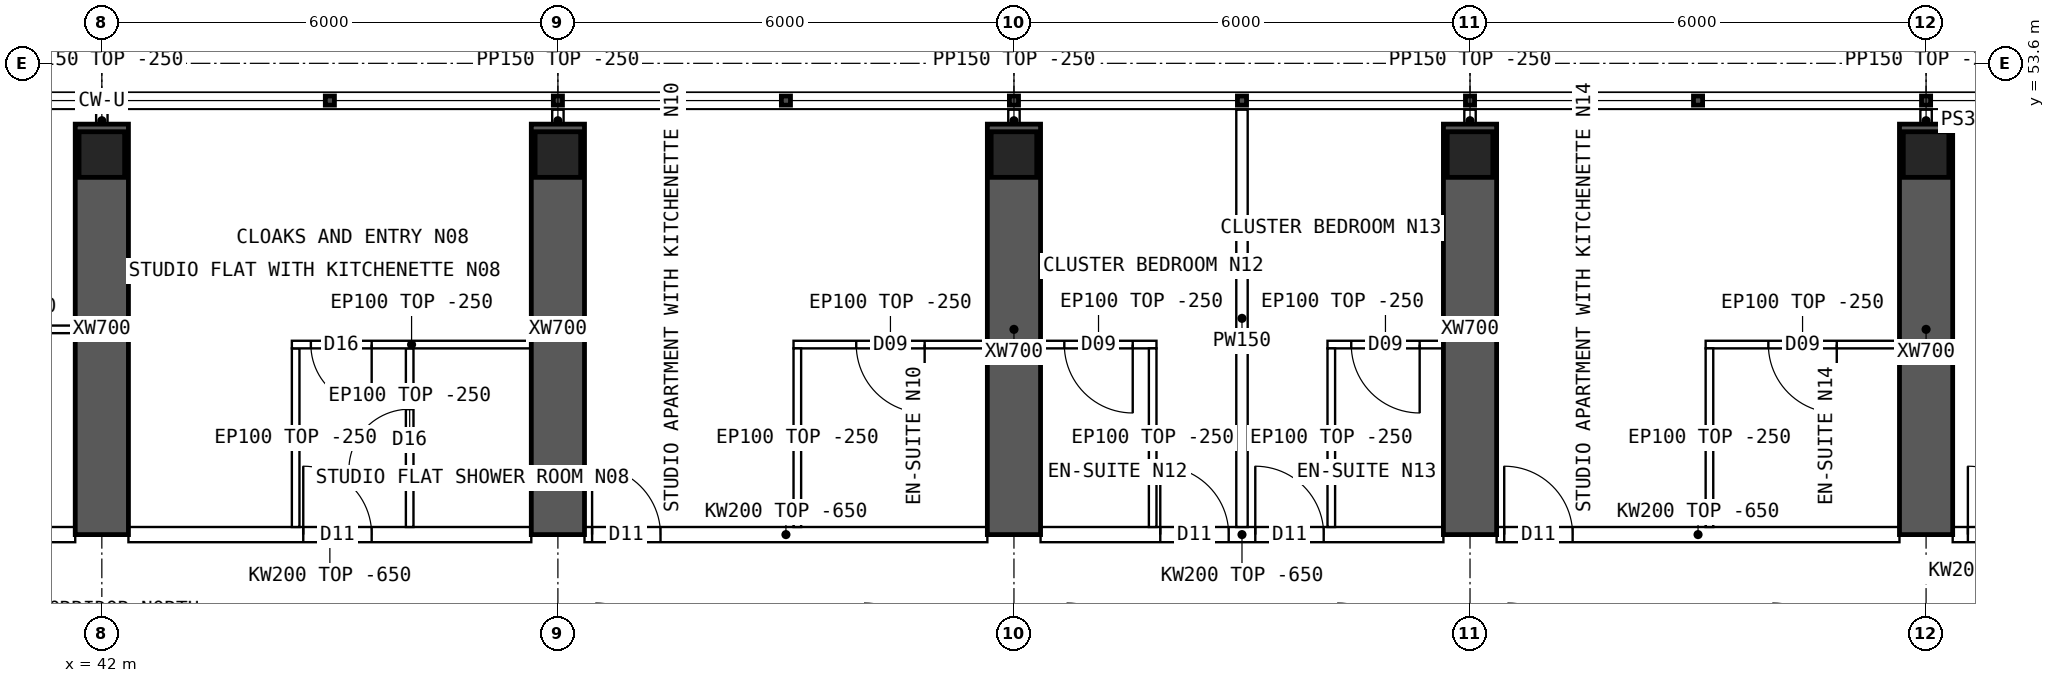
"""IFC4 building model, lengths in metres.
Left out: names, types, materials, properties, quantities, classifications, styles, units other than length and angle.
Written with IfcOpenShell. Run it as: python <this file> out.ifc"""

import sys

from ifc_helpers import new_model, si_unit, direction, frame, frame_2d, origin, origin_2d, place, context, subcontext, project, spatial, polyline, rectangle, hollow_rectangle, outline, extrude, element, fill, save


model = new_model("IFC4")
c1 = context("Model", 3, precision=1e-05, world=origin(), true_north=direction((0.0, 1.0)))
c2 = subcontext(c1, "Body", "Model", "MODEL_VIEW")
j1 = project(units=[si_unit("LENGTHUNIT", "METRE"), si_unit("PLANEANGLEUNIT", "RADIAN")], contexts=[c1])
p1 = place(None, origin())
s1 = spatial("IfcSite", under=j1, at=p1, CompositionType="ELEMENT")
p2 = place(p1, origin())
s2 = spatial("IfcBuilding", under=s1, at=p2, CompositionType="ELEMENT")
p3 = place(p2, frame((0.0, 0.0, 220.3)))
s3 = spatial("IfcBuildingStorey", under=s2, at=p3, CompositionType="ELEMENT", Elevation=220.3)
for number, where, z_axis, x_axis in (
    (1, (42.0, 52.4, 0.0), (0.0, 0.0, 1.0), (1.0, 0.0, 0.0)),
    (2, (48.0, 52.4, 0.0), (0.0, 0.0, 1.0), (1.0, 0.0, 0.0)),
    (3, (54.0, 52.4, 0.0), (0.0, 0.0, 1.0), (1.0, 0.0, 0.0)),
    (4, (60.0, 52.4, 0.0), (0.0, 0.0, 1.0), (1.0, 0.0, 0.0)),
    (5, (66.0, 52.4, 0.0), (0.0, 0.0, 1.0), (1.0, 0.0, 0.0)),
):
    element("IfcColumn", number, at=place(p3, frame(where, z_axis=z_axis, x_axis=x_axis)), inside=s3, PredefinedType="COLUMN", context=c2, shape_type="SweptSolid", body=[
        extrude(hollow_rectangle(XDim=0.6, YDim=0.6, WallThickness=0.06, at=origin_2d()), origin(), (0.0, 0.0, 1.0), 3.75),
    ])
for number, where, z_axis, x_axis in (
    (6, (42.0, 47.4, 0.0), (0.0, 0.0, 1.0), (0.0, 1.0, 0.0)),
    (7, (48.0, 47.4, 0.0), (0.0, 0.0, 1.0), (0.0, 1.0, 0.0)),
    (8, (54.0, 47.4, 0.0), (0.0, 0.0, 1.0), (0.0, 1.0, 0.0)),
    (9, (60.0, 47.4, 0.0), (0.0, 0.0, 1.0), (0.0, 1.0, 0.0)),
    (10, (66.0, 47.4, 0.0), (0.0, 0.0, 1.0), (0.0, 1.0, 0.0)),
):
    element("IfcWall", number, at=place(p3, frame(where, z_axis=z_axis, x_axis=x_axis)), inside=s3, PredefinedType="SHEAR", context=c2, shape_type="SweptSolid", body=[
        extrude(rectangle(XDim=5.4, YDim=0.7, at=frame_2d((2.7, 0.0))), origin(), (0.0, 0.0, 1.0), 3.75),
    ])
p4 = place(p3, frame((66.8, 52.85, 0.0), z_axis=(0.0, 0.0, 1.0), x_axis=(-1.0, 0.0, 0.0)))
e11 = element("IfcWall", 11, at=p4, inside=s3, PredefinedType="SOLIDWALL", context=c2, shape_type="SweptSolid", body=[
    extrude(rectangle(XDim=0.45, YDim=0.3, at=frame_2d((0.225, 0.0))), origin(), (0.0, 0.0, 1.0), 3.5),
])
p5 = place(p3, frame((36.35, 47.4, 0.0), z_axis=(0.0, 0.0, 1.0), x_axis=(1.0, 0.0, 0.0)))
e12 = element("IfcWall", 12, at=p5, inside=s3, PredefinedType="SOLIDWALL", context=c2, shape_type="SweptSolid", body=[
    extrude(outline(polyline([(0.0, 0.0), (5.3, 0.0), (5.3, 3.1), (0.0, 3.1), (0.0, 0.0)])), frame((0.0, 0.1, 0.0), z_axis=(0.0, -1.0, 0.0), x_axis=(1.0, 0.0, 0.0)), (0.0, 0.0, 1.0), 0.2),
])
p6 = place(p5, frame((0.3, 0.0, 0.0)))
e13 = element("IfcOpeningElement", 13, at=p6, cuts=e12, PredefinedType="OPENING", context=c2, shape_type="SweptSolid", body=[
    extrude(rectangle(XDim=1.0, YDim=2.1, at=frame_2d((0.5, 1.05))), frame((0.0, 0.11, 0.0), z_axis=(0.0, -1.0, 0.0), x_axis=(1.0, 0.0, 0.0)), (0.0, 0.0, 1.0), 0.22),
])
p7 = place(p3, frame((42.35, 47.4, 0.0), z_axis=(0.0, 0.0, 1.0), x_axis=(1.0, 0.0, 0.0)))
e14 = element("IfcWall", 14, at=p7, inside=s3, PredefinedType="SOLIDWALL", context=c2, shape_type="SweptSolid", body=[
    extrude(outline(polyline([(0.0, 0.0), (5.3, 0.0), (5.3, 3.1), (0.0, 3.1), (0.0, 0.0)])), frame((0.0, 0.1, 0.0), z_axis=(0.0, -1.0, 0.0), x_axis=(1.0, 0.0, 0.0)), (0.0, 0.0, 1.0), 0.2),
])
p8 = place(p7, frame((2.3, 0.0, 0.0)))
e15 = element("IfcOpeningElement", 15, at=p8, cuts=e14, PredefinedType="OPENING", context=c2, shape_type="SweptSolid", body=[
    extrude(rectangle(XDim=0.9, YDim=2.1, at=frame_2d((0.45, 1.05))), frame((0.0, 0.11, 0.0), z_axis=(0.0, -1.0, 0.0), x_axis=(1.0, 0.0, 0.0)), (0.0, 0.0, 1.0), 0.22),
])
p9 = place(p3, frame((48.35, 47.4, 0.0), z_axis=(0.0, 0.0, 1.0), x_axis=(1.0, 0.0, 0.0)))
e16 = element("IfcWall", 16, at=p9, inside=s3, PredefinedType="SOLIDWALL", context=c2, shape_type="SweptSolid", body=[
    extrude(outline(polyline([(0.0, 0.0), (5.3, 0.0), (5.3, 3.1), (0.0, 3.1), (0.0, 0.0)])), frame((0.0, 0.1, 0.0), z_axis=(0.0, -1.0, 0.0), x_axis=(1.0, 0.0, 0.0)), (0.0, 0.0, 1.0), 0.2),
])
p10 = place(p9, frame((0.1, 0.0, 0.0)))
e17 = element("IfcOpeningElement", 17, at=p10, cuts=e16, PredefinedType="OPENING", context=c2, shape_type="SweptSolid", body=[
    extrude(rectangle(XDim=0.9, YDim=2.1, at=frame_2d((0.45, 1.05))), frame((0.0, 0.11, 0.0), z_axis=(0.0, -1.0, 0.0), x_axis=(1.0, 0.0, 0.0)), (0.0, 0.0, 1.0), 0.22),
])
p11 = place(p3, frame((54.35, 47.4, 0.0), z_axis=(0.0, 0.0, 1.0), x_axis=(1.0, 0.0, 0.0)))
e18 = element("IfcWall", 18, at=p11, inside=s3, PredefinedType="SOLIDWALL", context=c2, shape_type="SweptSolid", body=[
    extrude(outline(polyline([(0.0, 0.0), (5.3, 0.0), (5.3, 3.1), (0.0, 3.1), (0.0, 0.0)])), frame((0.0, 0.1, 0.0), z_axis=(0.0, -1.0, 0.0), x_axis=(1.0, 0.0, 0.0)), (0.0, 0.0, 1.0), 0.2),
])
p12 = place(p11, frame((1.575, 0.0, 0.0)))
e19 = element("IfcOpeningElement", 19, at=p12, cuts=e18, PredefinedType="OPENING", context=c2, shape_type="SweptSolid", body=[
    extrude(rectangle(XDim=0.9, YDim=2.1, at=frame_2d((0.45, 1.05))), frame((0.0, 0.11, 0.0), z_axis=(0.0, -1.0, 0.0), x_axis=(1.0, 0.0, 0.0)), (0.0, 0.0, 1.0), 0.22),
])
p13 = place(p11, frame((2.825, 0.0, 0.0)))
e20 = element("IfcOpeningElement", 20, at=p13, cuts=e18, PredefinedType="OPENING", context=c2, shape_type="SweptSolid", body=[
    extrude(rectangle(XDim=0.9, YDim=2.1, at=frame_2d((0.45, 1.05))), frame((0.0, 0.11, 0.0), z_axis=(0.0, -1.0, 0.0), x_axis=(1.0, 0.0, 0.0)), (0.0, 0.0, 1.0), 0.22),
])
p14 = place(p3, frame((60.35, 47.4, 0.0), z_axis=(0.0, 0.0, 1.0), x_axis=(1.0, 0.0, 0.0)))
e21 = element("IfcWall", 21, at=p14, inside=s3, PredefinedType="SOLIDWALL", context=c2, shape_type="SweptSolid", body=[
    extrude(outline(polyline([(0.0, 0.0), (5.3, 0.0), (5.3, 3.1), (0.0, 3.1), (0.0, 0.0)])), frame((0.0, 0.1, 0.0), z_axis=(0.0, -1.0, 0.0), x_axis=(1.0, 0.0, 0.0)), (0.0, 0.0, 1.0), 0.2),
])
p15 = place(p14, frame((0.1, 0.0, 0.0)))
e22 = element("IfcOpeningElement", 22, at=p15, cuts=e21, PredefinedType="OPENING", context=c2, shape_type="SweptSolid", body=[
    extrude(rectangle(XDim=0.9, YDim=2.1, at=frame_2d((0.45, 1.05))), frame((0.0, 0.11, 0.0), z_axis=(0.0, -1.0, 0.0), x_axis=(1.0, 0.0, 0.0)), (0.0, 0.0, 1.0), 0.22),
])
p16 = place(p3, frame((66.35, 47.4, 0.0), z_axis=(0.0, 0.0, 1.0), x_axis=(1.0, 0.0, 0.0)))
e23 = element("IfcWall", 23, at=p16, inside=s3, PredefinedType="SOLIDWALL", context=c2, shape_type="SweptSolid", body=[
    extrude(rectangle(XDim=2.05, YDim=0.2, at=frame_2d((1.025, 0.0))), origin(), (0.0, 0.0, 1.0), 3.5),
])
p17 = place(p16, frame((0.2, 0.0, 0.0)))
e24 = element("IfcOpeningElement", 24, at=p17, cuts=e23, PredefinedType="OPENING", context=c2, shape_type="SweptSolid", body=[
    extrude(rectangle(XDim=0.9, YDim=2.1, at=frame_2d((0.45, 1.05))), frame((0.0, 0.11, 0.0), z_axis=(0.0, -1.0, 0.0), x_axis=(1.0, 0.0, 0.0)), (0.0, 0.0, 1.0), 0.22),
])
p18 = place(p3, frame((39.0, 50.1, 0.0), z_axis=(0.0, 0.0, 1.0), x_axis=(1.0, 0.0, 0.0)))
e25 = element("IfcWall", 25, at=p18, inside=s3, PredefinedType="PARTITIONING", context=c2, shape_type="SweptSolid", body=[
    extrude(rectangle(XDim=2.65, YDim=0.1, at=frame_2d((1.325, 0.0))), origin(), (0.0, 0.0, 1.0), 3.5),
])
p19 = place(p3, frame((44.5, 49.9, 0.0), z_axis=(0.0, 0.0, 1.0), x_axis=(1.0, 0.0, 0.0)))
e26 = element("IfcWall", 26, at=p19, inside=s3, PredefinedType="PARTITIONING", context=c2, shape_type="SweptSolid", body=[
    extrude(rectangle(XDim=3.15, YDim=0.1, at=frame_2d((1.575, 0.0))), origin(), (0.0, 0.0, 1.0), 3.5),
])
p20 = place(p19, frame((0.25, 0.0, 0.0)))
e27 = element("IfcOpeningElement", 27, at=p20, cuts=e26, PredefinedType="OPENING", context=c2, shape_type="SweptSolid", body=[
    extrude(rectangle(XDim=0.8, YDim=2.1, at=frame_2d((0.4, 1.05))), frame((0.0, 0.06, 0.0), z_axis=(0.0, -1.0, 0.0), x_axis=(1.0, 0.0, 0.0)), (0.0, 0.0, 1.0), 0.12),
])
p21 = place(p3, frame((44.55, 49.85, 0.0), z_axis=(0.0, 0.0, 1.0), x_axis=(0.0, -1.0, 0.0)))
e28 = element("IfcWall", 28, at=p21, inside=s3, PredefinedType="PARTITIONING", context=c2, shape_type="SweptSolid", body=[
    extrude(outline(polyline([(0.0, 0.0), (2.35, 0.0), (2.35, 3.1), (2.302, 3.1), (2.3, 3.5), (0.0, 3.5), (0.0, 0.0)])), frame((0.0, 0.05, 0.0), z_axis=(0.0, -1.0, 0.0), x_axis=(1.0, 0.0, 0.0)), (0.0, 0.0, 1.0), 0.1),
])
p22 = place(p3, frame((46.05, 49.85, 0.0), z_axis=(0.0, 0.0, 1.0), x_axis=(0.0, -1.0, 0.0)))
e29 = element("IfcWall", 29, at=p22, inside=s3, PredefinedType="PARTITIONING", context=c2, shape_type="SweptSolid", body=[
    extrude(outline(polyline([(0.0, 0.0), (2.35, 0.0), (2.35, 3.1), (2.302, 3.1), (2.3, 3.5), (0.0, 3.5), (0.0, 0.0)])), frame((0.0, 0.05, 0.0), z_axis=(0.0, -1.0, 0.0), x_axis=(1.0, 0.0, 0.0)), (0.0, 0.0, 1.0), 0.1),
])
p23 = place(p22, frame((0.8, 0.0, 0.0)))
e30 = element("IfcOpeningElement", 30, at=p23, cuts=e29, PredefinedType="OPENING", context=c2, shape_type="SweptSolid", body=[
    extrude(rectangle(XDim=0.8, YDim=2.1, at=frame_2d((0.4, 1.05))), frame((0.0, 0.06, 0.0), z_axis=(0.0, -1.0, 0.0), x_axis=(1.0, 0.0, 0.0)), (0.0, 0.0, 1.0), 0.12),
])
p24 = place(p3, frame((51.1, 49.9, 0.0), z_axis=(0.0, 0.0, 1.0), x_axis=(1.0, 0.0, 0.0)))
e31 = element("IfcWall", 31, at=p24, inside=s3, PredefinedType="PARTITIONING", context=c2, shape_type="SweptSolid", body=[
    extrude(rectangle(XDim=2.55, YDim=0.1, at=frame_2d((1.275, 0.0))), origin(), (0.0, 0.0, 1.0), 3.5),
])
p25 = place(p24, frame((0.825, 0.0, 0.0)))
e32 = element("IfcOpeningElement", 32, at=p25, cuts=e31, PredefinedType="OPENING", context=c2, shape_type="SweptSolid", body=[
    extrude(rectangle(XDim=0.9, YDim=2.1, at=frame_2d((0.45, 1.05))), frame((0.0, 0.06, 0.0), z_axis=(0.0, -1.0, 0.0), x_axis=(1.0, 0.0, 0.0)), (0.0, 0.0, 1.0), 0.12),
])
p26 = place(p3, frame((51.15, 49.85, 0.0), z_axis=(0.0, 0.0, 1.0), x_axis=(0.0, -1.0, 0.0)))
e33 = element("IfcWall", 33, at=p26, inside=s3, PredefinedType="PARTITIONING", context=c2, shape_type="SweptSolid", body=[
    extrude(outline(polyline([(0.0, 0.0), (2.35, 0.0), (2.35, 3.1), (2.302, 3.1), (2.3, 3.5), (0.0, 3.5), (0.0, 0.0)])), frame((0.0, 0.05, 0.0), z_axis=(0.0, -1.0, 0.0), x_axis=(1.0, 0.0, 0.0)), (0.0, 0.0, 1.0), 0.1),
])
p27 = place(p3, frame((57.0, 52.99, 0.0), z_axis=(0.0, 0.0, 1.0), x_axis=(0.0, -1.0, 0.0)))
e34 = element("IfcWall", 34, at=p27, inside=s3, PredefinedType="PARTITIONING", context=c2, shape_type="SweptSolid", body=[
    extrude(outline(polyline([(0.0, 0.0), (5.49, 0.0), (5.49, 3.1), (5.442, 3.1), (5.44, 3.5), (0.792, 3.5), (0.79, 3.1), (0.392, 3.1), (0.39, 3.5), (0.0, 3.5), (0.0, 0.0)])), frame((0.0, 0.075, 0.0), z_axis=(0.0, -1.0, 0.0), x_axis=(1.0, 0.0, 0.0)), (0.0, 0.0, 1.0), 0.15),
])
p28 = place(p3, frame((54.35, 49.9, 0.0), z_axis=(0.0, 0.0, 1.0), x_axis=(1.0, 0.0, 0.0)))
e35 = element("IfcWall", 35, at=p28, inside=s3, PredefinedType="PARTITIONING", context=c2, shape_type="SweptSolid", body=[
    extrude(rectangle(XDim=1.525, YDim=0.1, at=frame_2d((0.762, 0.0))), origin(), (0.0, 0.0, 1.0), 3.5),
])
p29 = place(p28, frame((0.312, 0.0, 0.0)))
e36 = element("IfcOpeningElement", 36, at=p29, cuts=e35, PredefinedType="OPENING", context=c2, shape_type="SweptSolid", body=[
    extrude(rectangle(XDim=0.9, YDim=2.1, at=frame_2d((0.45, 1.05))), frame((0.0, 0.06, 0.0), z_axis=(0.0, -1.0, 0.0), x_axis=(1.0, 0.0, 0.0)), (0.0, 0.0, 1.0), 0.12),
])
p30 = place(p3, frame((55.825, 49.85, 0.0), z_axis=(0.0, 0.0, 1.0), x_axis=(0.0, -1.0, 0.0)))
e37 = element("IfcWall", 37, at=p30, inside=s3, PredefinedType="PARTITIONING", context=c2, shape_type="SweptSolid", body=[
    extrude(outline(polyline([(0.0, 0.0), (2.35, 0.0), (2.35, 3.1), (2.302, 3.1), (2.3, 3.5), (0.0, 3.5), (0.0, 0.0)])), frame((0.0, 0.05, 0.0), z_axis=(0.0, -1.0, 0.0), x_axis=(1.0, 0.0, 0.0)), (0.0, 0.0, 1.0), 0.1),
])
p31 = place(p3, frame((58.125, 49.9, 0.0), z_axis=(0.0, 0.0, 1.0), x_axis=(1.0, 0.0, 0.0)))
e38 = element("IfcWall", 38, at=p31, inside=s3, PredefinedType="PARTITIONING", context=c2, shape_type="SweptSolid", body=[
    extrude(rectangle(XDim=1.525, YDim=0.1, at=frame_2d((0.762, 0.0))), origin(), (0.0, 0.0, 1.0), 3.5),
])
p32 = place(p31, frame((0.312, 0.0, 0.0)))
e39 = element("IfcOpeningElement", 39, at=p32, cuts=e38, PredefinedType="OPENING", context=c2, shape_type="SweptSolid", body=[
    extrude(rectangle(XDim=0.9, YDim=2.1, at=frame_2d((0.45, 1.05))), frame((0.0, 0.06, 0.0), z_axis=(0.0, -1.0, 0.0), x_axis=(1.0, 0.0, 0.0)), (0.0, 0.0, 1.0), 0.12),
])
p33 = place(p3, frame((58.175, 49.85, 0.0), z_axis=(0.0, 0.0, 1.0), x_axis=(0.0, -1.0, 0.0)))
e40 = element("IfcWall", 40, at=p33, inside=s3, PredefinedType="PARTITIONING", context=c2, shape_type="SweptSolid", body=[
    extrude(outline(polyline([(0.0, 0.0), (2.35, 0.0), (2.35, 3.1), (2.302, 3.1), (2.3, 3.5), (0.0, 3.5), (0.0, 0.0)])), frame((0.0, 0.05, 0.0), z_axis=(0.0, -1.0, 0.0), x_axis=(1.0, 0.0, 0.0)), (0.0, 0.0, 1.0), 0.1),
])
p34 = place(p3, frame((63.1, 49.9, 0.0), z_axis=(0.0, 0.0, 1.0), x_axis=(1.0, 0.0, 0.0)))
e41 = element("IfcWall", 41, at=p34, inside=s3, PredefinedType="PARTITIONING", context=c2, shape_type="SweptSolid", body=[
    extrude(rectangle(XDim=2.55, YDim=0.1, at=frame_2d((1.275, 0.0))), origin(), (0.0, 0.0, 1.0), 3.5),
])
p35 = place(p34, frame((0.825, 0.0, 0.0)))
e42 = element("IfcOpeningElement", 42, at=p35, cuts=e41, PredefinedType="OPENING", context=c2, shape_type="SweptSolid", body=[
    extrude(rectangle(XDim=0.9, YDim=2.1, at=frame_2d((0.45, 1.05))), frame((0.0, 0.06, 0.0), z_axis=(0.0, -1.0, 0.0), x_axis=(1.0, 0.0, 0.0)), (0.0, 0.0, 1.0), 0.12),
])
p36 = place(p3, frame((63.15, 49.85, 0.0), z_axis=(0.0, 0.0, 1.0), x_axis=(0.0, -1.0, 0.0)))
e43 = element("IfcWall", 43, at=p36, inside=s3, PredefinedType="PARTITIONING", context=c2, shape_type="SweptSolid", body=[
    extrude(outline(polyline([(0.0, 0.0), (2.35, 0.0), (2.35, 3.1), (2.302, 3.1), (2.3, 3.5), (0.0, 3.5), (0.0, 0.0)])), frame((0.0, 0.05, 0.0), z_axis=(0.0, -1.0, 0.0), x_axis=(1.0, 0.0, 0.0)), (0.0, 0.0, 1.0), 0.1),
])
for number, where, z_axis, x_axis in (
    (44, (42.0, 52.7, 0.0), (0.0, 0.0, 1.0), (0.0, 1.0, 0.0)),
    (45, (48.0, 52.7, 0.0), (0.0, 0.0, 1.0), (0.0, 1.0, 0.0)),
    (46, (54.0, 52.7, 0.0), (0.0, 0.0, 1.0), (0.0, 1.0, 0.0)),
    (47, (60.0, 52.7, 0.0), (0.0, 0.0, 1.0), (0.0, 1.0, 0.0)),
    (48, (66.0, 52.7, 0.0), (0.0, 0.0, 1.0), (0.0, 1.0, 0.0)),
):
    element("IfcWall", number, at=place(p3, frame(where, z_axis=z_axis, x_axis=x_axis)), inside=s3, PredefinedType="PARTITIONING", context=c2, shape_type="SweptSolid", body=[
        extrude(rectangle(XDim=0.29, YDim=0.15, at=frame_2d((0.145, 0.0))), origin(), (0.0, 0.0, 1.0), 3.5),
    ])
p37 = place(p20, origin())
e49 = element("IfcDoor", 49, at=p37, inside=s3, OperationType="SINGLE_SWING_RIGHT", PredefinedType="DOOR", context=c2, shape_type="SweptSolid", body=[
    extrude(rectangle(XDim=0.8, YDim=2.1, at=frame_2d((0.4, 1.05))), frame((0.0, 0.025, 0.0), z_axis=(0.0, -1.0, 0.0), x_axis=(1.0, 0.0, 0.0)), (0.0, 0.0, 1.0), 0.05),
])
fill(e27, e49)
p38 = place(p23, origin())
e50 = element("IfcDoor", 50, at=p38, inside=s3, OperationType="SINGLE_SWING_RIGHT", PredefinedType="DOOR", context=c2, shape_type="SweptSolid", body=[
    extrude(rectangle(XDim=0.8, YDim=2.1, at=frame_2d((0.4, 1.05))), frame((0.0, 0.025, 0.0), z_axis=(0.0, -1.0, 0.0), x_axis=(1.0, 0.0, 0.0)), (0.0, 0.0, 1.0), 0.05),
])
fill(e30, e50)
p39 = place(p8, origin())
e51 = element("IfcDoor", 51, at=p39, inside=s3, OperationType="SINGLE_SWING_LEFT", PredefinedType="DOOR", context=c2, shape_type="SweptSolid", body=[
    extrude(rectangle(XDim=0.9, YDim=2.1, at=frame_2d((0.45, 1.05))), frame((0.0, 0.025, 0.0), z_axis=(0.0, -1.0, 0.0), x_axis=(1.0, 0.0, 0.0)), (0.0, 0.0, 1.0), 0.05),
])
fill(e15, e51)
p40 = place(p25, origin())
e52 = element("IfcDoor", 52, at=p40, inside=s3, OperationType="SINGLE_SWING_RIGHT", PredefinedType="DOOR", context=c2, shape_type="SweptSolid", body=[
    extrude(rectangle(XDim=0.9, YDim=2.1, at=frame_2d((0.45, 1.05))), frame((0.0, 0.025, 0.0), z_axis=(0.0, -1.0, 0.0), x_axis=(1.0, 0.0, 0.0)), (0.0, 0.0, 1.0), 0.05),
])
fill(e32, e52)
p41 = place(p10, origin())
e53 = element("IfcDoor", 53, at=p41, inside=s3, OperationType="SINGLE_SWING_LEFT", PredefinedType="DOOR", context=c2, shape_type="SweptSolid", body=[
    extrude(rectangle(XDim=0.9, YDim=2.1, at=frame_2d((0.45, 1.05))), frame((0.0, 0.025, 0.0), z_axis=(0.0, -1.0, 0.0), x_axis=(1.0, 0.0, 0.0)), (0.0, 0.0, 1.0), 0.05),
])
fill(e17, e53)
p42 = place(p29, origin())
e54 = element("IfcDoor", 54, at=p42, inside=s3, OperationType="SINGLE_SWING_RIGHT", PredefinedType="DOOR", context=c2, shape_type="SweptSolid", body=[
    extrude(rectangle(XDim=0.9, YDim=2.1, at=frame_2d((0.45, 1.05))), frame((0.0, 0.025, 0.0), z_axis=(0.0, -1.0, 0.0), x_axis=(1.0, 0.0, 0.0)), (0.0, 0.0, 1.0), 0.05),
])
fill(e36, e54)
p43 = place(p12, origin())
e55 = element("IfcDoor", 55, at=p43, inside=s3, OperationType="SINGLE_SWING_LEFT", PredefinedType="DOOR", context=c2, shape_type="SweptSolid", body=[
    extrude(rectangle(XDim=0.9, YDim=2.1, at=frame_2d((0.45, 1.05))), frame((0.0, 0.025, 0.0), z_axis=(0.0, -1.0, 0.0), x_axis=(1.0, 0.0, 0.0)), (0.0, 0.0, 1.0), 0.05),
])
fill(e19, e55)
p44 = place(p32, origin())
e56 = element("IfcDoor", 56, at=p44, inside=s3, OperationType="SINGLE_SWING_RIGHT", PredefinedType="DOOR", context=c2, shape_type="SweptSolid", body=[
    extrude(rectangle(XDim=0.9, YDim=2.1, at=frame_2d((0.45, 1.05))), frame((0.0, 0.025, 0.0), z_axis=(0.0, -1.0, 0.0), x_axis=(1.0, 0.0, 0.0)), (0.0, 0.0, 1.0), 0.05),
])
fill(e39, e56)
p45 = place(p13, origin())
e57 = element("IfcDoor", 57, at=p45, inside=s3, OperationType="SINGLE_SWING_LEFT", PredefinedType="DOOR", context=c2, shape_type="SweptSolid", body=[
    extrude(rectangle(XDim=0.9, YDim=2.1, at=frame_2d((0.45, 1.05))), frame((0.0, 0.025, 0.0), z_axis=(0.0, -1.0, 0.0), x_axis=(1.0, 0.0, 0.0)), (0.0, 0.0, 1.0), 0.05),
])
fill(e20, e57)
p46 = place(p35, origin())
e58 = element("IfcDoor", 58, at=p46, inside=s3, OperationType="SINGLE_SWING_RIGHT", PredefinedType="DOOR", context=c2, shape_type="SweptSolid", body=[
    extrude(rectangle(XDim=0.9, YDim=2.1, at=frame_2d((0.45, 1.05))), frame((0.0, 0.025, 0.0), z_axis=(0.0, -1.0, 0.0), x_axis=(1.0, 0.0, 0.0)), (0.0, 0.0, 1.0), 0.05),
])
fill(e42, e58)
p47 = place(p15, origin())
e59 = element("IfcDoor", 59, at=p47, inside=s3, OperationType="SINGLE_SWING_LEFT", PredefinedType="DOOR", context=c2, shape_type="SweptSolid", body=[
    extrude(rectangle(XDim=0.9, YDim=2.1, at=frame_2d((0.45, 1.05))), frame((0.0, 0.025, 0.0), z_axis=(0.0, -1.0, 0.0), x_axis=(1.0, 0.0, 0.0)), (0.0, 0.0, 1.0), 0.05),
])
fill(e22, e59)
p48 = place(p17, origin())
e60 = element("IfcDoor", 60, at=p48, inside=s3, OperationType="SINGLE_SWING_LEFT", PredefinedType="DOOR", context=c2, shape_type="SweptSolid", body=[
    extrude(rectangle(XDim=0.9, YDim=2.1, at=frame_2d((0.45, 1.05))), frame((0.0, 0.025, 0.0), z_axis=(0.0, -1.0, 0.0), x_axis=(1.0, 0.0, 0.0)), (0.0, 0.0, 1.0), 0.05),
])
fill(e24, e60)
save(model, sys.argv[1])
